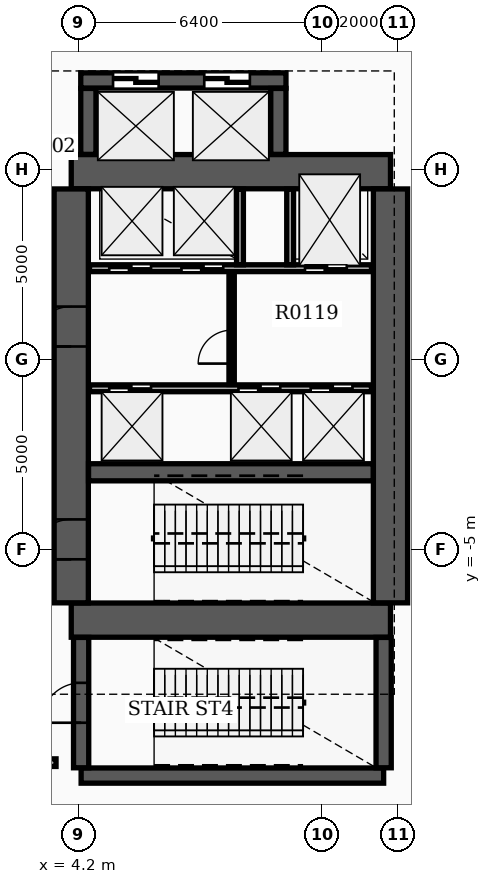
"""IFC4 building model, lengths in metres.
Left out: names, types, materials, properties, quantities, classifications, styles, units other than length and angle.
Written with IfcOpenShell. Run it as: python <this file> out.ifc"""

import sys

from ifc_helpers import new_model, si_unit, direction, frame, frame_2d, origin, place, context, subcontext, project, spatial, rectangle, extrude, element, fill, save


model = new_model("IFC4")
c1 = context("Model", 3, precision=1e-05, world=origin(), true_north=direction((0.0, 1.0)))
c2 = subcontext(c1, "Body", "Model", "MODEL_VIEW")
j1 = project(units=[si_unit("LENGTHUNIT", "METRE"), si_unit("PLANEANGLEUNIT", "RADIAN")], contexts=[c1])
p1 = place(None, origin())
s1 = spatial("IfcSite", under=j1, at=p1, CompositionType="ELEMENT")
p2 = place(p1, origin())
s2 = spatial("IfcBuilding", under=s1, at=p2, CompositionType="ELEMENT")
p3 = place(p2, origin())
s3 = spatial("IfcBuildingStorey", under=s2, at=p3, CompositionType="ELEMENT", Elevation=0.0)
for number, where, z_axis, x_axis in (
    (1, (4.0, -6.85, 0.0), (0.0, 0.0, 1.0), (1.0, 0.0, 0.0)),
    (2, (4.0, 4.95, 0.0), (0.0, 0.0, 1.0), (1.0, 0.0, 0.0)),
):
    element("IfcWall", number, at=place(p3, frame(where, z_axis=z_axis, x_axis=x_axis)), inside=s3, PredefinedType="SHEAR", context=c2, shape_type="SweptSolid", body=[
        extrude(rectangle(XDim=8.4, YDim=0.9, at=frame_2d((4.2, 0.0))), origin(), (0.0, 0.0, 1.0), 5.15),
    ])
p4 = place(p3, frame((4.0, -6.395, 0.0), z_axis=(0.0, 0.0, 1.0), x_axis=(0.0, 1.0, 0.0)))
e3 = element("IfcWall", 3, at=p4, inside=s3, PredefinedType="SHEAR", context=c2, shape_type="SweptSolid", body=[
    extrude(rectangle(XDim=10.89, YDim=0.9, at=frame_2d((5.445, 0.0))), origin(), (0.0, 0.0, 1.0), 5.15),
])
p5 = place(p4, frame((1.145, 0.0, 0.0)))
e4 = element("IfcOpeningElement", 4, at=p5, cuts=e3, PredefinedType="OPENING", context=c2, shape_type="SweptSolid", body=[
    extrude(rectangle(XDim=1.05, YDim=2.15, at=frame_2d((0.525, 1.075))), frame((0.0, 0.46, 0.0), z_axis=(0.0, -1.0, 0.0), x_axis=(1.0, 0.0, 0.0)), (0.0, 0.0, 1.0), 0.92),
])
p6 = place(p4, frame((6.745, 0.0, 0.0)))
e5 = element("IfcOpeningElement", 5, at=p6, cuts=e3, PredefinedType="OPENING", context=c2, shape_type="SweptSolid", body=[
    extrude(rectangle(XDim=1.05, YDim=2.15, at=frame_2d((0.525, 1.075))), frame((0.0, 0.46, 0.0), z_axis=(0.0, -1.0, 0.0), x_axis=(1.0, 0.0, 0.0)), (0.0, 0.0, 1.0), 0.92),
])
p7 = place(p3, frame((12.4, -6.395, 0.0), z_axis=(0.0, 0.0, 1.0), x_axis=(0.0, 1.0, 0.0)))
e6 = element("IfcWall", 6, at=p7, inside=s3, PredefinedType="SHEAR", context=c2, shape_type="SweptSolid", body=[
    extrude(rectangle(XDim=10.89, YDim=0.9, at=frame_2d((5.445, 0.0))), origin(), (0.0, 0.0, 1.0), 5.15),
])
p8 = place(p3, frame((4.455, -2.96, 0.0), z_axis=(0.0, 0.0, 1.0), x_axis=(1.0, 0.0, 0.0)))
e7 = element("IfcWall", 7, at=p8, inside=s3, PredefinedType="SHEAR", context=c2, shape_type="SweptSolid", body=[
    extrude(rectangle(XDim=7.49, YDim=0.45, at=frame_2d((3.745, 0.0))), origin(), (0.0, 0.0, 1.0), 5.15),
])
p9 = place(p3, frame((4.26, -10.94, 0.0), z_axis=(0.0, 0.0, 1.0), x_axis=(1.0, 0.0, 0.0)))
e8 = element("IfcWall", 8, at=p9, inside=s3, PredefinedType="SHEAR", context=c2, shape_type="SweptSolid", body=[
    extrude(rectangle(XDim=7.96, YDim=0.4, at=frame_2d((3.98, 0.0))), origin(), (0.0, 0.0, 1.0), 5.15),
])
p10 = place(p3, frame((4.26, -10.735, 0.0), z_axis=(0.0, 0.0, 1.0), x_axis=(0.0, 1.0, 0.0)))
e9 = element("IfcWall", 9, at=p10, inside=s3, PredefinedType="SHEAR", context=c2, shape_type="SweptSolid", body=[
    extrude(rectangle(XDim=3.43, YDim=0.4, at=frame_2d((1.715, 0.0))), origin(), (0.0, 0.0, 1.0), 5.15),
])
p11 = place(p10, frame((1.185, 0.0, 0.0)))
e10 = element("IfcOpeningElement", 10, at=p11, cuts=e9, PredefinedType="OPENING", context=c2, shape_type="SweptSolid", body=[
    extrude(rectangle(XDim=1.05, YDim=2.15, at=frame_2d((0.525, 1.075))), frame((0.0, 0.21, 0.0), z_axis=(0.0, -1.0, 0.0), x_axis=(1.0, 0.0, 0.0)), (0.0, 0.0, 1.0), 0.42),
])
p12 = place(p3, frame((12.22, -10.735, 0.0), z_axis=(0.0, 0.0, 1.0), x_axis=(0.0, 1.0, 0.0)))
e11 = element("IfcWall", 11, at=p12, inside=s3, PredefinedType="SHEAR", context=c2, shape_type="SweptSolid", body=[
    extrude(rectangle(XDim=3.43, YDim=0.4, at=frame_2d((1.715, 0.0))), origin(), (0.0, 0.0, 1.0), 5.15),
])
p13 = place(p3, frame((4.45, 5.405, 0.0), z_axis=(0.0, 0.0, 1.0), x_axis=(0.0, 1.0, 0.0)))
e12 = element("IfcWall", 12, at=p13, inside=s3, PredefinedType="SHEAR", context=c2, shape_type="SweptSolid", body=[
    extrude(rectangle(XDim=1.735, YDim=0.4, at=frame_2d((0.867, 0.0))), origin(), (0.0, 0.0, 1.0), 5.15),
])
p14 = place(p3, frame((4.25, 7.35, 0.0), z_axis=(0.0, 0.0, 1.0), x_axis=(1.0, 0.0, 0.0)))
e13 = element("IfcWall", 13, at=p14, inside=s3, PredefinedType="SHEAR", context=c2, shape_type="SweptSolid", body=[
    extrude(rectangle(XDim=5.4, YDim=0.4, at=frame_2d((2.7, 0.0))), origin(), (0.0, 0.0, 1.0), 5.15),
])
p15 = place(p14, frame((0.85, 0.0, 0.0)))
e14 = element("IfcOpeningElement", 14, at=p15, cuts=e13, PredefinedType="OPENING", context=c2, shape_type="SweptSolid", body=[
    extrude(rectangle(XDim=1.2, YDim=2.2, at=frame_2d((0.6, 1.1))), frame((0.0, 0.21, 0.0), z_axis=(0.0, -1.0, 0.0), x_axis=(1.0, 0.0, 0.0)), (0.0, 0.0, 1.0), 0.42),
])
p16 = place(p14, frame((3.25, 0.0, 0.0)))
e15 = element("IfcOpeningElement", 15, at=p16, cuts=e13, PredefinedType="OPENING", context=c2, shape_type="SweptSolid", body=[
    extrude(rectangle(XDim=1.2, YDim=2.2, at=frame_2d((0.6, 1.1))), frame((0.0, 0.21, 0.0), z_axis=(0.0, -1.0, 0.0), x_axis=(1.0, 0.0, 0.0)), (0.0, 0.0, 1.0), 0.42),
])
p17 = place(p3, frame((9.45, 5.405, 0.0), z_axis=(0.0, 0.0, 1.0), x_axis=(0.0, 1.0, 0.0)))
e16 = element("IfcWall", 16, at=p17, inside=s3, PredefinedType="SHEAR", context=c2, shape_type="SweptSolid", body=[
    extrude(rectangle(XDim=1.735, YDim=0.4, at=frame_2d((0.867, 0.0))), origin(), (0.0, 0.0, 1.0), 5.15),
])
p18 = place(p3, frame((4.48, 2.41, 0.0), z_axis=(0.0, 0.0, 1.0), x_axis=(1.0, 0.0, 0.0)))
e17 = element("IfcWall", 17, at=p18, inside=s3, PredefinedType="SOLIDWALL", context=c2, shape_type="SweptSolid", body=[
    extrude(rectangle(XDim=7.42, YDim=0.18, at=frame_2d((3.71, 0.0))), origin(), (0.0, 0.0, 1.0), 2.67),
])
p19 = place(p18, frame((5.67, 0.0, 0.0)))
e18 = element("IfcOpeningElement", 18, at=p19, cuts=e17, PredefinedType="OPENING", context=c2, shape_type="SweptSolid", body=[
    extrude(rectangle(XDim=1.1, YDim=2.15, at=frame_2d((0.55, 1.075))), frame((0.0, 0.1, 0.0), z_axis=(0.0, -1.0, 0.0), x_axis=(1.0, 0.0, 0.0)), (0.0, 0.0, 1.0), 0.2),
])
p20 = place(p18, frame((0.52, 0.0, 0.0)))
e19 = element("IfcOpeningElement", 19, at=p20, cuts=e17, PredefinedType="OPENING", context=c2, shape_type="SweptSolid", body=[
    extrude(rectangle(XDim=1.1, YDim=2.15, at=frame_2d((0.55, 1.075))), frame((0.0, 0.1, 0.0), z_axis=(0.0, -1.0, 0.0), x_axis=(1.0, 0.0, 0.0)), (0.0, 0.0, 1.0), 0.2),
])
p21 = place(p18, frame((2.42, 0.0, 0.0)))
e20 = element("IfcOpeningElement", 20, at=p21, cuts=e17, PredefinedType="OPENING", context=c2, shape_type="SweptSolid", body=[
    extrude(rectangle(XDim=1.1, YDim=2.15, at=frame_2d((0.55, 1.075))), frame((0.0, 0.1, 0.0), z_axis=(0.0, -1.0, 0.0), x_axis=(1.0, 0.0, 0.0)), (0.0, 0.0, 1.0), 0.2),
])
p22 = place(p3, frame((4.48, -0.75, 0.0), z_axis=(0.0, 0.0, 1.0), x_axis=(1.0, 0.0, 0.0)))
e21 = element("IfcWall", 21, at=p22, inside=s3, PredefinedType="SOLIDWALL", context=c2, shape_type="SweptSolid", body=[
    extrude(rectangle(XDim=7.42, YDim=0.18, at=frame_2d((3.71, 0.0))), origin(), (0.0, 0.0, 1.0), 2.67),
])
p23 = place(p22, frame((0.52, 0.0, 0.0)))
e22 = element("IfcOpeningElement", 22, at=p23, cuts=e21, PredefinedType="OPENING", context=c2, shape_type="SweptSolid", body=[
    extrude(rectangle(XDim=1.1, YDim=2.15, at=frame_2d((0.55, 1.075))), frame((0.0, 0.1, 0.0), z_axis=(0.0, -1.0, 0.0), x_axis=(1.0, 0.0, 0.0)), (0.0, 0.0, 1.0), 0.2),
])
p24 = place(p22, frame((3.92, 0.0, 0.0)))
e23 = element("IfcOpeningElement", 23, at=p24, cuts=e21, PredefinedType="OPENING", context=c2, shape_type="SweptSolid", body=[
    extrude(rectangle(XDim=1.1, YDim=2.15, at=frame_2d((0.55, 1.075))), frame((0.0, 0.1, 0.0), z_axis=(0.0, -1.0, 0.0), x_axis=(1.0, 0.0, 0.0)), (0.0, 0.0, 1.0), 0.2),
])
p25 = place(p22, frame((5.82, 0.0, 0.0)))
e24 = element("IfcOpeningElement", 24, at=p25, cuts=e21, PredefinedType="OPENING", context=c2, shape_type="SweptSolid", body=[
    extrude(rectangle(XDim=1.1, YDim=2.15, at=frame_2d((0.55, 1.075))), frame((0.0, 0.1, 0.0), z_axis=(0.0, -1.0, 0.0), x_axis=(1.0, 0.0, 0.0)), (0.0, 0.0, 1.0), 0.2),
])
for number, where, z_axis, x_axis in (
    (25, (8.44, 2.5, 0.0), (0.0, 0.0, 1.0), (0.0, 1.0, 0.0)),
    (26, (9.76, 2.5, 0.0), (0.0, 0.0, 1.0), (0.0, 1.0, 0.0)),
):
    element("IfcWall", number, at=place(p3, frame(where, z_axis=z_axis, x_axis=x_axis)), inside=s3, PredefinedType="SOLIDWALL", context=c2, shape_type="SweptSolid", body=[
        extrude(rectangle(XDim=1.99, YDim=0.18, at=frame_2d((0.995, 0.0))), origin(), (0.0, 0.0, 1.0), 2.67),
    ])
p26 = place(p3, frame((8.22, -0.65, 0.0), z_axis=(0.0, 0.0, 1.0), x_axis=(0.0, 1.0, 0.0)))
e27 = element("IfcWall", 27, at=p26, inside=s3, PredefinedType="SOLIDWALL", context=c2, shape_type="SweptSolid", body=[
    extrude(rectangle(XDim=2.96, YDim=0.14, at=frame_2d((1.48, 0.0))), origin(), (0.0, 0.0, 1.0), 2.67),
])
p27 = place(p26, frame((0.55, 0.0, 0.0)))
e28 = element("IfcOpeningElement", 28, at=p27, cuts=e27, PredefinedType="OPENING", context=c2, shape_type="SweptSolid", body=[
    extrude(rectangle(XDim=0.88, YDim=2.1, at=frame_2d((0.44, 1.05))), frame((0.0, 0.08, 0.0), z_axis=(0.0, -1.0, 0.0), x_axis=(1.0, 0.0, 0.0)), (0.0, 0.0, 1.0), 0.16),
])
p28 = place(p3, frame((-3.6, -10.6, 0.0), z_axis=(0.0, 0.0, 1.0), x_axis=(1.0, 0.0, 0.0)))
e29 = element("IfcWall", 29, at=p28, inside=s3, PredefinedType="PARTITIONING", context=c2, shape_type="SweptSolid", body=[
    extrude(rectangle(XDim=7.2, YDim=0.2, at=frame_2d((3.6, 0.0))), origin(), (0.0, 0.0, 1.0), 2.67),
])
p29 = place(p28, frame((2.85, 0.0, 0.0)))
e30 = element("IfcOpeningElement", 30, at=p29, cuts=e29, PredefinedType="OPENING", context=c2, shape_type="SweptSolid", body=[
    extrude(rectangle(XDim=1.5, YDim=2.15, at=frame_2d((0.75, 1.075))), frame((0.0, 0.11, 0.0), z_axis=(0.0, -1.0, 0.0), x_axis=(1.0, 0.0, 0.0)), (0.0, 0.0, 1.0), 0.22),
])
p30 = place(p5, origin())
e31 = element("IfcDoor", 31, at=p30, inside=s3, OperationType="SINGLE_SWING_LEFT", PredefinedType="DOOR", context=c2, shape_type="SweptSolid", body=[
    extrude(rectangle(XDim=1.05, YDim=2.15, at=frame_2d((0.525, 1.075))), frame((0.0, 0.025, 0.0), z_axis=(0.0, -1.0, 0.0), x_axis=(1.0, 0.0, 0.0)), (0.0, 0.0, 1.0), 0.05),
])
fill(e4, e31)
p31 = place(p6, origin())
e32 = element("IfcDoor", 32, at=p31, inside=s3, OperationType="SINGLE_SWING_LEFT", PredefinedType="DOOR", context=c2, shape_type="SweptSolid", body=[
    extrude(rectangle(XDim=1.05, YDim=2.15, at=frame_2d((0.525, 1.075))), frame((0.0, 0.025, 0.0), z_axis=(0.0, -1.0, 0.0), x_axis=(1.0, 0.0, 0.0)), (0.0, 0.0, 1.0), 0.05),
])
fill(e5, e32)
p32 = place(p11, origin())
e33 = element("IfcDoor", 33, at=p32, inside=s3, OperationType="SINGLE_SWING_LEFT", PredefinedType="DOOR", context=c2, shape_type="SweptSolid", body=[
    extrude(rectangle(XDim=1.05, YDim=2.15, at=frame_2d((0.525, 1.075))), frame((0.0, 0.025, 0.0), z_axis=(0.0, -1.0, 0.0), x_axis=(1.0, 0.0, 0.0)), (0.0, 0.0, 1.0), 0.05),
])
fill(e10, e33)
p33 = place(p19, origin())
e34 = element("IfcDoor", 34, at=p33, inside=s3, OperationType="DOUBLE_DOOR_SLIDING", PredefinedType="DOOR", context=c2, shape_type="SweptSolid", body=[
    extrude(rectangle(XDim=1.1, YDim=2.15, at=frame_2d((0.55, 1.075))), frame((0.0, 0.025, 0.0), z_axis=(0.0, -1.0, 0.0), x_axis=(1.0, 0.0, 0.0)), (0.0, 0.0, 1.0), 0.05),
])
fill(e18, e34)
p34 = place(p20, origin())
e35 = element("IfcDoor", 35, at=p34, inside=s3, OperationType="DOUBLE_DOOR_SLIDING", PredefinedType="DOOR", context=c2, shape_type="SweptSolid", body=[
    extrude(rectangle(XDim=1.1, YDim=2.15, at=frame_2d((0.55, 1.075))), frame((0.0, 0.025, 0.0), z_axis=(0.0, -1.0, 0.0), x_axis=(1.0, 0.0, 0.0)), (0.0, 0.0, 1.0), 0.05),
])
fill(e19, e35)
p35 = place(p21, origin())
e36 = element("IfcDoor", 36, at=p35, inside=s3, OperationType="DOUBLE_DOOR_SLIDING", PredefinedType="DOOR", context=c2, shape_type="SweptSolid", body=[
    extrude(rectangle(XDim=1.1, YDim=2.15, at=frame_2d((0.55, 1.075))), frame((0.0, 0.025, 0.0), z_axis=(0.0, -1.0, 0.0), x_axis=(1.0, 0.0, 0.0)), (0.0, 0.0, 1.0), 0.05),
])
fill(e20, e36)
p36 = place(p23, origin())
e37 = element("IfcDoor", 37, at=p36, inside=s3, OperationType="DOUBLE_DOOR_SLIDING", PredefinedType="DOOR", context=c2, shape_type="SweptSolid", body=[
    extrude(rectangle(XDim=1.1, YDim=2.15, at=frame_2d((0.55, 1.075))), frame((0.0, 0.025, 0.0), z_axis=(0.0, -1.0, 0.0), x_axis=(1.0, 0.0, 0.0)), (0.0, 0.0, 1.0), 0.05),
])
fill(e22, e37)
p37 = place(p24, origin())
e38 = element("IfcDoor", 38, at=p37, inside=s3, OperationType="DOUBLE_DOOR_SLIDING", PredefinedType="DOOR", context=c2, shape_type="SweptSolid", body=[
    extrude(rectangle(XDim=1.1, YDim=2.15, at=frame_2d((0.55, 1.075))), frame((0.0, 0.025, 0.0), z_axis=(0.0, -1.0, 0.0), x_axis=(1.0, 0.0, 0.0)), (0.0, 0.0, 1.0), 0.05),
])
fill(e23, e38)
p38 = place(p25, origin())
e39 = element("IfcDoor", 39, at=p38, inside=s3, OperationType="DOUBLE_DOOR_SLIDING", PredefinedType="DOOR", context=c2, shape_type="SweptSolid", body=[
    extrude(rectangle(XDim=1.1, YDim=2.15, at=frame_2d((0.55, 1.075))), frame((0.0, 0.025, 0.0), z_axis=(0.0, -1.0, 0.0), x_axis=(1.0, 0.0, 0.0)), (0.0, 0.0, 1.0), 0.05),
])
fill(e24, e39)
p39 = place(p15, origin())
e40 = element("IfcDoor", 40, at=p39, inside=s3, OperationType="DOUBLE_DOOR_SLIDING", PredefinedType="DOOR", context=c2, shape_type="SweptSolid", body=[
    extrude(rectangle(XDim=1.2, YDim=2.2, at=frame_2d((0.6, 1.1))), frame((0.0, 0.025, 0.0), z_axis=(0.0, -1.0, 0.0), x_axis=(1.0, 0.0, 0.0)), (0.0, 0.0, 1.0), 0.05),
])
fill(e14, e40)
p40 = place(p16, origin())
e41 = element("IfcDoor", 41, at=p40, inside=s3, OperationType="DOUBLE_DOOR_SLIDING", PredefinedType="DOOR", context=c2, shape_type="SweptSolid", body=[
    extrude(rectangle(XDim=1.2, YDim=2.2, at=frame_2d((0.6, 1.1))), frame((0.0, 0.025, 0.0), z_axis=(0.0, -1.0, 0.0), x_axis=(1.0, 0.0, 0.0)), (0.0, 0.0, 1.0), 0.05),
])
fill(e15, e41)
p41 = place(p27, origin())
e42 = element("IfcDoor", 42, at=p41, inside=s3, OperationType="SINGLE_SWING_LEFT", PredefinedType="DOOR", context=c2, shape_type="SweptSolid", body=[
    extrude(rectangle(XDim=0.88, YDim=2.1, at=frame_2d((0.44, 1.05))), frame((0.0, 0.025, 0.0), z_axis=(0.0, -1.0, 0.0), x_axis=(1.0, 0.0, 0.0)), (0.0, 0.0, 1.0), 0.05),
])
fill(e28, e42)
save(model, sys.argv[1])
